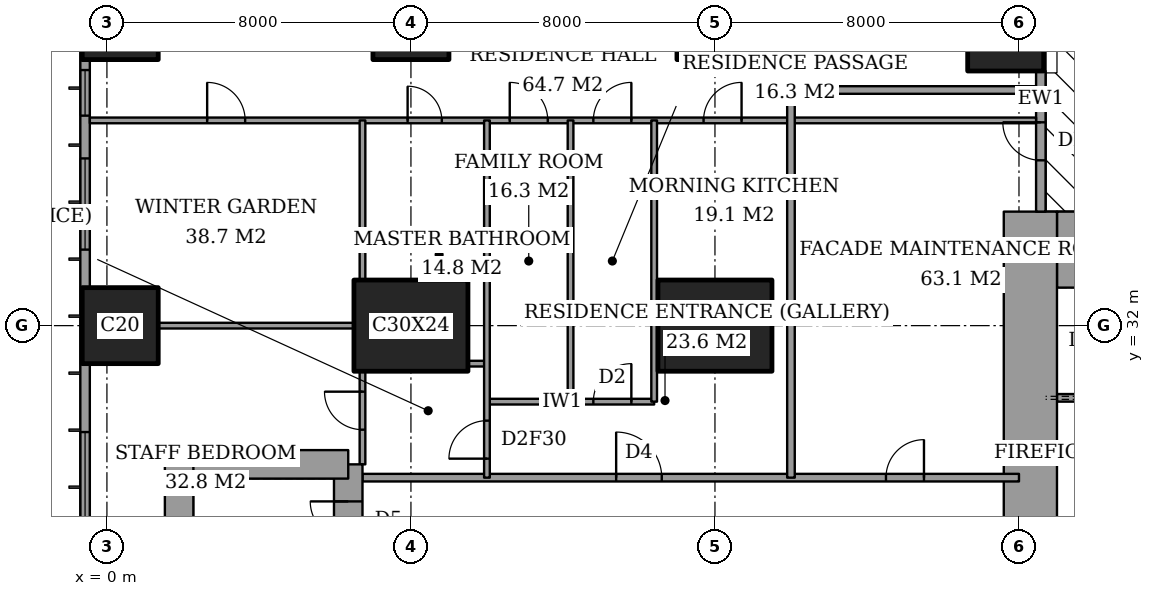
"""IFC4 building model, lengths in metres.
Left out: names, types, materials, properties, quantities, classifications, styles, units other than length and angle.
Written with IfcOpenShell. Run it as: python <this file> out.ifc"""

import sys

from ifc_helpers import new_model, si_unit, direction, frame, frame_2d, origin, origin_2d, place, context, subcontext, project, spatial, rectangle, extrude, element, fill, save


model = new_model("IFC4")
c1 = context("Model", 3, precision=1e-05, world=origin(), true_north=direction((0.0, 1.0)))
c2 = subcontext(c1, "Body", "Model", "MODEL_VIEW")
j1 = project(units=[si_unit("LENGTHUNIT", "METRE"), si_unit("PLANEANGLEUNIT", "RADIAN")], contexts=[c1])
p1 = place(None, origin())
s1 = spatial("IfcSite", under=j1, at=p1, CompositionType="ELEMENT")
p2 = place(p1, origin())
s2 = spatial("IfcBuilding", under=s1, at=p2, CompositionType="ELEMENT")
p3 = place(p2, frame((0.0, 0.0, 96.2)))
s3 = spatial("IfcBuildingStorey", under=s2, at=p3, CompositionType="ELEMENT", Elevation=96.2)
for number, where, z_axis, x_axis in (
    (1, (0.35, 32.0, 0.0), (0.0, 0.0, 1.0), (1.0, 0.0, 0.0)),
    (2, (0.35, 40.0, 0.0), (0.0, 0.0, 1.0), (1.0, 0.0, 0.0)),
):
    element("IfcColumn", number, at=place(p3, frame(where, z_axis=z_axis, x_axis=x_axis)), inside=s3, PredefinedType="COLUMN", context=c2, shape_type="SweptSolid", body=[
        extrude(rectangle(XDim=2.0, YDim=2.0, at=origin_2d()), origin(), (0.0, 0.0, 1.0), 3.6),
    ])
p4 = place(p3, frame((8.0, 32.0, 0.0), z_axis=(0.0, 0.0, 1.0), x_axis=(1.0, 0.0, 0.0)))
e3 = element("IfcColumn", 3, at=p4, inside=s3, PredefinedType="COLUMN", context=c2, shape_type="SweptSolid", body=[
    extrude(rectangle(XDim=3.0, YDim=2.4, at=origin_2d()), origin(), (0.0, 0.0, 1.0), 3.6),
])
p5 = place(p3, frame((8.0, 40.0, 0.0), z_axis=(0.0, 0.0, 1.0), x_axis=(1.0, 0.0, 0.0)))
e4 = element("IfcColumn", 4, at=p5, inside=s3, PredefinedType="COLUMN", context=c2, shape_type="SweptSolid", body=[
    extrude(rectangle(XDim=2.0, YDim=2.0, at=origin_2d()), origin(), (0.0, 0.0, 1.0), 3.6),
])
p6 = place(p3, frame((16.0, 32.0, 0.0), z_axis=(0.0, 0.0, 1.0), x_axis=(1.0, 0.0, 0.0)))
e5 = element("IfcColumn", 5, at=p6, inside=s3, PredefinedType="COLUMN", context=c2, shape_type="SweptSolid", body=[
    extrude(rectangle(XDim=3.0, YDim=2.4, at=origin_2d()), origin(), (0.0, 0.0, 1.0), 3.6),
])
p7 = place(p3, frame((16.0, 40.0, 0.0), z_axis=(0.0, 0.0, 1.0), x_axis=(1.0, 0.0, 0.0)))
e6 = element("IfcColumn", 6, at=p7, inside=s3, PredefinedType="COLUMN", context=c2, shape_type="SweptSolid", body=[
    extrude(rectangle(XDim=2.0, YDim=2.0, at=origin_2d()), origin(), (0.0, 0.0, 1.0), 3.6),
])
p8 = place(p3, frame((23.65, 40.0, 0.0), z_axis=(0.0, 0.0, 1.0), x_axis=(1.0, 0.0, 0.0)))
e7 = element("IfcColumn", 7, at=p8, inside=s3, PredefinedType="COLUMN", context=c2, shape_type="SweptSolid", body=[
    extrude(rectangle(XDim=2.0, YDim=2.6, at=origin_2d()), origin(), (0.0, 0.0, 1.0), 3.6),
])
p9 = place(p3, frame((25.0, 34.0, 0.0), z_axis=(0.0, 0.0, 1.0), x_axis=(1.0, 0.0, 0.0)))
e8 = element("IfcWall", 8, at=p9, inside=s3, PredefinedType="SHEAR", context=c2, shape_type="SweptSolid", body=[
    extrude(rectangle(XDim=3.15, YDim=2.0, at=frame_2d((1.575, 0.0))), origin(), (0.0, 0.0, 1.0), 3.6),
])
p10 = place(p3, frame((24.3, 23.15, 0.0), z_axis=(0.0, 0.0, 1.0), x_axis=(0.0, 1.0, 0.0)))
e9 = element("IfcWall", 9, at=p10, inside=s3, PredefinedType="SHEAR", context=c2, shape_type="SweptSolid", body=[
    extrude(rectangle(XDim=11.85, YDim=1.4, at=frame_2d((5.925, 0.0))), origin(), (0.0, 0.0, 1.0), 3.6),
])
p11 = place(p10, frame((0.75, 0.0, 0.0)))
e10 = element("IfcOpeningElement", 10, at=p11, cuts=e9, PredefinedType="OPENING", context=c2, shape_type="SweptSolid", body=[
    extrude(rectangle(XDim=1.8, YDim=2.4, at=frame_2d((0.9, 1.2))), frame((0.0, 0.71, 0.0), z_axis=(0.0, -1.0, 0.0), x_axis=(1.0, 0.0, 0.0)), (0.0, 0.0, 1.0), 1.42),
])
p12 = place(p3, frame((6.35, 19.65, 0.0), z_axis=(0.0, 0.0, 1.0), x_axis=(0.0, 1.0, 0.0)))
e11 = element("IfcWall", 11, at=p12, inside=s3, PredefinedType="SHEAR", context=c2, shape_type="SweptSolid", body=[
    extrude(rectangle(XDim=8.7, YDim=0.75, at=frame_2d((4.35, 0.0))), origin(), (0.0, 0.0, 1.0), 3.6),
])
p13 = place(p12, frame((6.725, 0.0, 0.0)))
e12 = element("IfcOpeningElement", 12, at=p13, cuts=e11, PredefinedType="OPENING", context=c2, shape_type="SweptSolid", body=[
    extrude(rectangle(XDim=1.0, YDim=2.1, at=frame_2d((0.5, 1.05))), frame((0.0, 0.385, 0.0), z_axis=(0.0, -1.0, 0.0), x_axis=(1.0, 0.0, 0.0)), (0.0, 0.0, 1.0), 0.77),
])
p14 = place(p3, frame((6.35, 28.35, 0.0), z_axis=(0.0, 0.0, 1.0), x_axis=(-1.0, 0.0, 0.0)))
e13 = element("IfcWall", 13, at=p14, inside=s3, PredefinedType="SHEAR", context=c2, shape_type="SweptSolid", body=[
    extrude(rectangle(XDim=4.45, YDim=0.75, at=frame_2d((2.225, 0.0))), origin(), (0.0, 0.0, 1.0), 3.6),
])
p15 = place(p3, frame((1.9, 28.35, 0.0), z_axis=(0.0, 0.0, 1.0), x_axis=(0.0, -1.0, 0.0)))
e14 = element("IfcWall", 14, at=p15, inside=s3, PredefinedType="SHEAR", context=c2, shape_type="SweptSolid", body=[
    extrude(rectangle(XDim=8.7, YDim=0.75, at=frame_2d((4.35, 0.0))), origin(), (0.0, 0.0, 1.0), 3.6),
])
p16 = place(p3, frame((24.575, 35.0, 0.0), z_axis=(0.0, 0.0, 1.0), x_axis=(0.0, 1.0, 0.0)))
e15 = element("IfcWall", 15, at=p16, inside=s3, PredefinedType="SOLIDWALL", context=c2, shape_type="SweptSolid", body=[
    extrude(rectangle(XDim=3.7, YDim=0.25, at=frame_2d((1.85, 0.0))), origin(), (0.0, 0.0, 1.0), 3.6),
])
p17 = place(p16, frame((1.35, 0.0, 0.0)))
e16 = element("IfcOpeningElement", 16, at=p17, cuts=e15, PredefinedType="OPENING", context=c2, shape_type="SweptSolid", body=[
    extrude(rectangle(XDim=1.0, YDim=2.1, at=frame_2d((0.5, 1.05))), frame((0.0, 0.135, 0.0), z_axis=(0.0, -1.0, 0.0), x_axis=(1.0, 0.0, 0.0)), (0.0, 0.0, 1.0), 0.27),
])
p18 = place(p3, frame((-0.575, 44.825, 0.0), z_axis=(0.0, 0.0, 1.0), x_axis=(0.0, -1.0, 0.0)))
e17 = element("IfcWall", 17, at=p18, inside=s3, PredefinedType="SOLIDWALL", context=c2, shape_type="SweptSolid", body=[
    extrude(rectangle(XDim=41.65, YDim=0.25, at=frame_2d((20.825, 0.0))), origin(), (0.0, 0.0, 1.0), 3.6),
])
p19 = place(p18, frame((0.775, 0.0, 0.4)))
e18 = element("IfcOpeningElement", 18, at=p19, cuts=e17, PredefinedType="OPENING", context=c2, shape_type="SweptSolid", body=[
    extrude(rectangle(XDim=2.4, YDim=2.2, at=frame_2d((1.2, 1.1))), frame((0.0, 0.135, 0.0), z_axis=(0.0, -1.0, 0.0), x_axis=(1.0, 0.0, 0.0)), (0.0, 0.0, 1.0), 0.27),
])
p20 = place(p18, frame((6.1, 0.0, 0.4)))
e19 = element("IfcOpeningElement", 19, at=p20, cuts=e17, PredefinedType="OPENING", context=c2, shape_type="SweptSolid", body=[
    extrude(rectangle(XDim=1.2, YDim=2.2, at=frame_2d((0.6, 1.1))), frame((0.0, 0.135, 0.0), z_axis=(0.0, -1.0, 0.0), x_axis=(1.0, 0.0, 0.0)), (0.0, 0.0, 1.0), 0.27),
])
p21 = place(p18, frame((8.425, 0.0, 0.4)))
e20 = element("IfcOpeningElement", 20, at=p21, cuts=e17, PredefinedType="OPENING", context=c2, shape_type="SweptSolid", body=[
    extrude(rectangle(XDim=2.4, YDim=2.2, at=frame_2d((1.2, 1.1))), frame((0.0, 0.135, 0.0), z_axis=(0.0, -1.0, 0.0), x_axis=(1.0, 0.0, 0.0)), (0.0, 0.0, 1.0), 0.27),
])
p22 = place(p18, frame((15.625, 0.0, 0.4)))
e21 = element("IfcOpeningElement", 21, at=p22, cuts=e17, PredefinedType="OPENING", context=c2, shape_type="SweptSolid", body=[
    extrude(rectangle(XDim=2.4, YDim=2.2, at=frame_2d((1.2, 1.1))), frame((0.0, 0.135, 0.0), z_axis=(0.0, -1.0, 0.0), x_axis=(1.0, 0.0, 0.0)), (0.0, 0.0, 1.0), 0.27),
])
p23 = place(p18, frame((23.625, 0.0, 0.4)))
e22 = element("IfcOpeningElement", 22, at=p23, cuts=e17, PredefinedType="OPENING", context=c2, shape_type="SweptSolid", body=[
    extrude(rectangle(XDim=2.4, YDim=2.2, at=frame_2d((1.2, 1.1))), frame((0.0, 0.135, 0.0), z_axis=(0.0, -1.0, 0.0), x_axis=(1.0, 0.0, 0.0)), (0.0, 0.0, 1.0), 0.27),
])
p24 = place(p18, frame((30.725, 0.0, 0.4)))
e23 = element("IfcOpeningElement", 23, at=p24, cuts=e17, PredefinedType="OPENING", context=c2, shape_type="SweptSolid", body=[
    extrude(rectangle(XDim=2.4, YDim=2.2, at=frame_2d((1.2, 1.1))), frame((0.0, 0.135, 0.0), z_axis=(0.0, -1.0, 0.0), x_axis=(1.0, 0.0, 0.0)), (0.0, 0.0, 1.0), 0.27),
])
p25 = place(p18, frame((34.325, 0.0, 0.4)))
e24 = element("IfcOpeningElement", 24, at=p25, cuts=e17, PredefinedType="OPENING", context=c2, shape_type="SweptSolid", body=[
    extrude(rectangle(XDim=1.2, YDim=2.2, at=frame_2d((0.6, 1.1))), frame((0.0, 0.135, 0.0), z_axis=(0.0, -1.0, 0.0), x_axis=(1.0, 0.0, 0.0)), (0.0, 0.0, 1.0), 0.27),
])
p26 = place(p18, frame((38.475, 0.0, 0.4)))
e25 = element("IfcOpeningElement", 25, at=p26, cuts=e17, PredefinedType="OPENING", context=c2, shape_type="SweptSolid", body=[
    extrude(rectangle(XDim=2.4, YDim=2.2, at=frame_2d((1.2, 1.1))), frame((0.0, 0.135, 0.0), z_axis=(0.0, -1.0, 0.0), x_axis=(1.0, 0.0, 0.0)), (0.0, 0.0, 1.0), 0.27),
])
p27 = place(p3, frame((6.725, 28.0, 0.0), z_axis=(0.0, 0.0, 1.0), x_axis=(1.0, 0.0, 0.0)))
e26 = element("IfcWall", 26, at=p27, inside=s3, PredefinedType="PARTITIONING", context=c2, shape_type="SweptSolid", body=[
    extrude(rectangle(XDim=17.275, YDim=0.2, at=frame_2d((8.637, 0.0))), origin(), (0.0, 0.0, 1.0), 3.35),
])
p28 = place(p27, frame((6.675, 0.0, 0.0)))
e27 = element("IfcOpeningElement", 27, at=p28, cuts=e26, PredefinedType="OPENING", context=c2, shape_type="SweptSolid", body=[
    extrude(rectangle(XDim=1.2, YDim=2.4, at=frame_2d((0.6, 1.2))), frame((0.0, 0.11, 0.0), z_axis=(0.0, -1.0, 0.0), x_axis=(1.0, 0.0, 0.0)), (0.0, 0.0, 1.0), 0.22),
])
p29 = place(p27, frame((13.775, 0.0, 0.0)))
e28 = element("IfcOpeningElement", 28, at=p29, cuts=e26, PredefinedType="OPENING", context=c2, shape_type="SweptSolid", body=[
    extrude(rectangle(XDim=1.0, YDim=2.1, at=frame_2d((0.5, 1.05))), frame((0.0, 0.11, 0.0), z_axis=(0.0, -1.0, 0.0), x_axis=(1.0, 0.0, 0.0)), (0.0, 0.0, 1.0), 0.22),
])
p30 = place(p3, frame((10.0, 30.0, 0.0), z_axis=(0.0, 0.0, 1.0), x_axis=(1.0, 0.0, 0.0)))
e29 = element("IfcWall", 29, at=p30, inside=s3, PredefinedType="PARTITIONING", context=c2, shape_type="SweptSolid", body=[
    extrude(rectangle(XDim=4.4, YDim=0.15, at=frame_2d((2.2, 0.0))), origin(), (0.0, 0.0, 1.0), 3.35),
])
p31 = place(p30, frame((2.8, 0.0, 0.0)))
e30 = element("IfcOpeningElement", 30, at=p31, cuts=e29, PredefinedType="OPENING", context=c2, shape_type="SweptSolid", body=[
    extrude(rectangle(XDim=1.0, YDim=2.1, at=frame_2d((0.5, 1.05))), frame((0.0, 0.085, 0.0), z_axis=(0.0, -1.0, 0.0), x_axis=(1.0, 0.0, 0.0)), (0.0, 0.0, 1.0), 0.17),
])
p32 = place(p3, frame((9.5, 31.0, 0.0), z_axis=(0.0, 0.0, 1.0), x_axis=(1.0, 0.0, 0.0)))
e31 = element("IfcWall", 31, at=p32, inside=s3, PredefinedType="PARTITIONING", context=c2, shape_type="SweptSolid", body=[
    extrude(rectangle(XDim=0.5, YDim=0.15, at=frame_2d((0.25, 0.0))), origin(), (0.0, 0.0, 1.0), 3.35),
])
p33 = place(p3, frame((1.35, 32.0, 0.0), z_axis=(0.0, 0.0, 1.0), x_axis=(1.0, 0.0, 0.0)))
e32 = element("IfcWall", 32, at=p33, inside=s3, PredefinedType="PARTITIONING", context=c2, shape_type="SweptSolid", body=[
    extrude(rectangle(XDim=5.15, YDim=0.15, at=frame_2d((2.575, 0.0))), origin(), (0.0, 0.0, 1.0), 2.634),
])
p34 = place(p3, frame((17.5, 32.1, 0.0), z_axis=(0.0, 0.0, 1.0), x_axis=(1.0, 0.0, 0.0)))
e33 = element("IfcWall", 33, at=p34, inside=s3, PredefinedType="PARTITIONING", context=c2, shape_type="SweptSolid", body=[
    extrude(rectangle(XDim=0.5, YDim=0.15, at=frame_2d((0.25, 0.0))), origin(), (0.0, 0.0, 1.0), 2.634),
])
p35 = place(p3, frame((-0.45, 37.4, 0.0), z_axis=(0.0, 0.0, 1.0), x_axis=(1.0, 0.0, 0.0)))
e34 = element("IfcWall", 34, at=p35, inside=s3, PredefinedType="PARTITIONING", context=c2, shape_type="SweptSolid", body=[
    extrude(rectangle(XDim=24.9, YDim=0.15, at=frame_2d((12.45, 0.0))), origin(), (0.0, 0.0, 1.0), 3.35),
])
p36 = place(p35, frame((13.25, 0.0, 0.0)))
e35 = element("IfcOpeningElement", 35, at=p36, cuts=e34, PredefinedType="OPENING", context=c2, shape_type="SweptSolid", body=[
    extrude(rectangle(XDim=1.0, YDim=2.1, at=frame_2d((0.5, 1.05))), frame((0.0, 0.085, 0.0), z_axis=(0.0, -1.0, 0.0), x_axis=(1.0, 0.0, 0.0)), (0.0, 0.0, 1.0), 0.17),
])
p37 = place(p35, frame((3.087, 0.0, 0.0)))
e36 = element("IfcOpeningElement", 36, at=p37, cuts=e34, PredefinedType="OPENING", context=c2, shape_type="SweptSolid", body=[
    extrude(rectangle(XDim=1.0, YDim=2.1, at=frame_2d((0.5, 1.05))), frame((0.0, 0.085, 0.0), z_axis=(0.0, -1.0, 0.0), x_axis=(1.0, 0.0, 0.0)), (0.0, 0.0, 1.0), 0.17),
])
p38 = place(p35, frame((8.363, 0.0, 0.0)))
e37 = element("IfcOpeningElement", 37, at=p38, cuts=e34, PredefinedType="OPENING", context=c2, shape_type="SweptSolid", body=[
    extrude(rectangle(XDim=0.9, YDim=2.1, at=frame_2d((0.45, 1.05))), frame((0.0, 0.085, 0.0), z_axis=(0.0, -1.0, 0.0), x_axis=(1.0, 0.0, 0.0)), (0.0, 0.0, 1.0), 0.17),
])
p39 = place(p35, frame((11.05, 0.0, 0.0)))
e38 = element("IfcOpeningElement", 38, at=p39, cuts=e34, PredefinedType="OPENING", context=c2, shape_type="SweptSolid", body=[
    extrude(rectangle(XDim=1.0, YDim=2.1, at=frame_2d((0.5, 1.05))), frame((0.0, 0.085, 0.0), z_axis=(0.0, -1.0, 0.0), x_axis=(1.0, 0.0, 0.0)), (0.0, 0.0, 1.0), 0.17),
])
p40 = place(p35, frame((16.15, 0.0, 0.0)))
e39 = element("IfcOpeningElement", 39, at=p40, cuts=e34, PredefinedType="OPENING", context=c2, shape_type="SweptSolid", body=[
    extrude(rectangle(XDim=1.0, YDim=2.1, at=frame_2d((0.5, 1.05))), frame((0.0, 0.085, 0.0), z_axis=(0.0, -1.0, 0.0), x_axis=(1.0, 0.0, 0.0)), (0.0, 0.0, 1.0), 0.17),
])
p41 = place(p3, frame((18.0, 38.2, 0.0), z_axis=(0.0, 0.0, 1.0), x_axis=(1.0, 0.0, 0.0)))
e40 = element("IfcWall", 40, at=p41, inside=s3, PredefinedType="PARTITIONING", context=c2, shape_type="SweptSolid", body=[
    extrude(rectangle(XDim=6.45, YDim=0.2, at=frame_2d((3.225, 0.0))), origin(), (0.0, 0.0, 1.0), 3.35),
])
p42 = place(p3, frame((6.725, 28.35, 0.0), z_axis=(0.0, 0.0, 1.0), x_axis=(0.0, 1.0, 0.0)))
e41 = element("IfcWall", 41, at=p42, inside=s3, PredefinedType="PARTITIONING", context=c2, shape_type="SweptSolid", body=[
    extrude(rectangle(XDim=2.45, YDim=0.15, at=frame_2d((1.225, 0.0))), origin(), (0.0, 0.0, 1.0), 3.35),
])
p43 = place(p42, frame((0.913, 0.0, 0.0)))
e42 = element("IfcOpeningElement", 42, at=p43, cuts=e41, PredefinedType="OPENING", context=c2, shape_type="SweptSolid", body=[
    extrude(rectangle(XDim=1.0, YDim=2.1, at=frame_2d((0.5, 1.05))), frame((0.0, 0.085, 0.0), z_axis=(0.0, -1.0, 0.0), x_axis=(1.0, 0.0, 0.0)), (0.0, 0.0, 1.0), 0.17),
])
p44 = place(p3, frame((6.725, 33.2, 0.0), z_axis=(0.0, 0.0, 1.0), x_axis=(0.0, 1.0, 0.0)))
e43 = element("IfcWall", 43, at=p44, inside=s3, PredefinedType="PARTITIONING", context=c2, shape_type="SweptSolid", body=[
    extrude(rectangle(XDim=4.2, YDim=0.15, at=frame_2d((2.1, 0.0))), origin(), (0.0, 0.0, 1.0), 3.35),
])
p45 = place(p3, frame((10.0, 28.0, 0.0), z_axis=(0.0, 0.0, 1.0), x_axis=(0.0, 1.0, 0.0)))
e44 = element("IfcWall", 44, at=p45, inside=s3, PredefinedType="PARTITIONING", context=c2, shape_type="SweptSolid", body=[
    extrude(rectangle(XDim=9.4, YDim=0.15, at=frame_2d((4.7, 0.0))), origin(), (0.0, 0.0, 1.0), 3.35),
])
p46 = place(p45, frame((0.5, 0.0, 0.0)))
e45 = element("IfcOpeningElement", 45, at=p46, cuts=e44, PredefinedType="OPENING", context=c2, shape_type="SweptSolid", body=[
    extrude(rectangle(XDim=1.0, YDim=2.1, at=frame_2d((0.5, 1.05))), frame((0.0, 0.085, 0.0), z_axis=(0.0, -1.0, 0.0), x_axis=(1.0, 0.0, 0.0)), (0.0, 0.0, 1.0), 0.17),
])
for number, where, z_axis, x_axis in (
    (46, (12.2, 30.0, 0.0), (0.0, 0.0, 1.0), (0.0, 1.0, 0.0)),
    (47, (14.4, 30.0, 0.0), (0.0, 0.0, 1.0), (0.0, 1.0, 0.0)),
):
    element("IfcWall", number, at=place(p3, frame(where, z_axis=z_axis, x_axis=x_axis)), inside=s3, PredefinedType="PARTITIONING", context=c2, shape_type="SweptSolid", body=[
        extrude(rectangle(XDim=7.4, YDim=0.15, at=frame_2d((3.7, 0.0))), origin(), (0.0, 0.0, 1.0), 3.35),
    ])
p47 = place(p3, frame((18.0, 28.0, 0.0), z_axis=(0.0, 0.0, 1.0), x_axis=(0.0, 1.0, 0.0)))
e48 = element("IfcWall", 48, at=p47, inside=s3, PredefinedType="PARTITIONING", context=c2, shape_type="SweptSolid", body=[
    extrude(rectangle(XDim=10.2, YDim=0.2, at=frame_2d((5.1, 0.0))), origin(), (0.0, 0.0, 1.0), 3.35),
])
p48 = place(p3, frame((25.0, 30.1, 0.0), z_axis=(0.0, 0.0, 1.0), x_axis=(1.0, 0.0, 0.0)))
e49 = element("IfcWall", 49, at=p48, inside=s3, PredefinedType="PARTITIONING", context=c2, shape_type="SweptSolid", body=[
    extrude(rectangle(XDim=12.7, YDim=0.2, at=frame_2d((6.35, 0.0))), origin(), (0.0, 0.0, 1.0), 3.6),
])
p49 = place(p48, frame((0.9, 0.0, 0.0)))
e50 = element("IfcOpeningElement", 50, at=p49, cuts=e49, PredefinedType="OPENING", context=c2, shape_type="SweptSolid", body=[
    extrude(rectangle(XDim=1.2, YDim=2.1, at=frame_2d((0.6, 1.05))), frame((0.0, 0.11, 0.0), z_axis=(0.0, -1.0, 0.0), x_axis=(1.0, 0.0, 0.0)), (0.0, 0.0, 1.0), 0.22),
])
p50 = place(p17, origin())
e51 = element("IfcDoor", 51, at=p50, inside=s3, OperationType="SINGLE_SWING_LEFT", PredefinedType="DOOR", context=c2, shape_type="SweptSolid", body=[
    extrude(rectangle(XDim=1.0, YDim=2.1, at=frame_2d((0.5, 1.05))), frame((0.0, 0.025, 0.0), z_axis=(0.0, -1.0, 0.0), x_axis=(1.0, 0.0, 0.0)), (0.0, 0.0, 1.0), 0.05),
])
fill(e16, e51)
p51 = place(p20, origin())
e52 = element("IfcWindow", 52, at=p51, inside=s3, PartitioningType="SINGLE_PANEL", PredefinedType="WINDOW", context=c2, shape_type="SweptSolid", body=[
    extrude(rectangle(XDim=1.2, YDim=2.2, at=frame_2d((0.6, 1.1))), frame((0.0, 0.03, 0.0), z_axis=(0.0, -1.0, 0.0), x_axis=(1.0, 0.0, 0.0)), (0.0, 0.0, 1.0), 0.06),
])
fill(e19, e52)
p52 = place(p21, origin())
e53 = element("IfcWindow", 53, at=p52, inside=s3, PartitioningType="SINGLE_PANEL", PredefinedType="WINDOW", context=c2, shape_type="SweptSolid", body=[
    extrude(rectangle(XDim=2.4, YDim=2.2, at=frame_2d((1.2, 1.1))), frame((0.0, 0.03, 0.0), z_axis=(0.0, -1.0, 0.0), x_axis=(1.0, 0.0, 0.0)), (0.0, 0.0, 1.0), 0.06),
])
fill(e20, e53)
p53 = place(p22, origin())
e54 = element("IfcWindow", 54, at=p53, inside=s3, PartitioningType="SINGLE_PANEL", PredefinedType="WINDOW", context=c2, shape_type="SweptSolid", body=[
    extrude(rectangle(XDim=2.4, YDim=2.2, at=frame_2d((1.2, 1.1))), frame((0.0, 0.03, 0.0), z_axis=(0.0, -1.0, 0.0), x_axis=(1.0, 0.0, 0.0)), (0.0, 0.0, 1.0), 0.06),
])
fill(e21, e54)
p54 = place(p36, origin())
e55 = element("IfcDoor", 55, at=p54, inside=s3, OperationType="SINGLE_SWING_LEFT", PredefinedType="DOOR", context=c2, shape_type="SweptSolid", body=[
    extrude(rectangle(XDim=1.0, YDim=2.1, at=frame_2d((0.5, 1.05))), frame((0.0, 0.025, 0.0), z_axis=(0.0, -1.0, 0.0), x_axis=(1.0, 0.0, 0.0)), (0.0, 0.0, 1.0), 0.05),
])
fill(e35, e55)
p55 = place(p37, origin())
e56 = element("IfcDoor", 56, at=p55, inside=s3, OperationType="SINGLE_SWING_RIGHT", PredefinedType="DOOR", context=c2, shape_type="SweptSolid", body=[
    extrude(rectangle(XDim=1.0, YDim=2.1, at=frame_2d((0.5, 1.05))), frame((0.0, 0.025, 0.0), z_axis=(0.0, -1.0, 0.0), x_axis=(1.0, 0.0, 0.0)), (0.0, 0.0, 1.0), 0.05),
])
fill(e36, e56)
p56 = place(p43, origin())
e57 = element("IfcDoor", 57, at=p56, inside=s3, OperationType="SINGLE_SWING_LEFT", PredefinedType="DOOR", context=c2, shape_type="SweptSolid", body=[
    extrude(rectangle(XDim=1.0, YDim=2.1, at=frame_2d((0.5, 1.05))), frame((0.0, 0.025, 0.0), z_axis=(0.0, -1.0, 0.0), x_axis=(1.0, 0.0, 0.0)), (0.0, 0.0, 1.0), 0.05),
])
fill(e42, e57)
p57 = place(p38, origin())
e58 = element("IfcDoor", 58, at=p57, inside=s3, OperationType="SINGLE_SWING_RIGHT", PredefinedType="DOOR", context=c2, shape_type="SweptSolid", body=[
    extrude(rectangle(XDim=0.9, YDim=2.1, at=frame_2d((0.45, 1.05))), frame((0.0, 0.025, 0.0), z_axis=(0.0, -1.0, 0.0), x_axis=(1.0, 0.0, 0.0)), (0.0, 0.0, 1.0), 0.05),
])
fill(e37, e58)
p58 = place(p46, origin())
e59 = element("IfcDoor", 59, at=p58, inside=s3, OperationType="SINGLE_SWING_RIGHT", PredefinedType="DOOR", context=c2, shape_type="SweptSolid", body=[
    extrude(rectangle(XDim=1.0, YDim=2.1, at=frame_2d((0.5, 1.05))), frame((0.0, 0.025, 0.0), z_axis=(0.0, -1.0, 0.0), x_axis=(1.0, 0.0, 0.0)), (0.0, 0.0, 1.0), 0.05),
])
fill(e45, e59)
p59 = place(p28, origin())
e60 = element("IfcDoor", 60, at=p59, inside=s3, OperationType="SINGLE_SWING_RIGHT", PredefinedType="DOOR", context=c2, shape_type="SweptSolid", body=[
    extrude(rectangle(XDim=1.2, YDim=2.4, at=frame_2d((0.6, 1.2))), frame((0.0, 0.025, 0.0), z_axis=(0.0, -1.0, 0.0), x_axis=(1.0, 0.0, 0.0)), (0.0, 0.0, 1.0), 0.05),
])
fill(e27, e60)
p60 = place(p39, origin())
e61 = element("IfcDoor", 61, at=p60, inside=s3, OperationType="SINGLE_SWING_RIGHT", PredefinedType="DOOR", context=c2, shape_type="SweptSolid", body=[
    extrude(rectangle(XDim=1.0, YDim=2.1, at=frame_2d((0.5, 1.05))), frame((0.0, 0.025, 0.0), z_axis=(0.0, -1.0, 0.0), x_axis=(1.0, 0.0, 0.0)), (0.0, 0.0, 1.0), 0.05),
])
fill(e38, e61)
p61 = place(p31, origin())
e62 = element("IfcDoor", 62, at=p61, inside=s3, OperationType="SINGLE_SWING_LEFT", PredefinedType="DOOR", context=c2, shape_type="SweptSolid", body=[
    extrude(rectangle(XDim=1.0, YDim=2.1, at=frame_2d((0.5, 1.05))), frame((0.0, 0.025, 0.0), z_axis=(0.0, -1.0, 0.0), x_axis=(1.0, 0.0, 0.0)), (0.0, 0.0, 1.0), 0.05),
])
fill(e30, e62)
p62 = place(p40, origin())
e63 = element("IfcDoor", 63, at=p62, inside=s3, OperationType="SINGLE_SWING_LEFT", PredefinedType="DOOR", context=c2, shape_type="SweptSolid", body=[
    extrude(rectangle(XDim=1.0, YDim=2.1, at=frame_2d((0.5, 1.05))), frame((0.0, 0.025, 0.0), z_axis=(0.0, -1.0, 0.0), x_axis=(1.0, 0.0, 0.0)), (0.0, 0.0, 1.0), 0.05),
])
fill(e39, e63)
p63 = place(p29, origin())
e64 = element("IfcDoor", 64, at=p63, inside=s3, OperationType="SINGLE_SWING_LEFT", PredefinedType="DOOR", context=c2, shape_type="SweptSolid", body=[
    extrude(rectangle(XDim=1.0, YDim=2.1, at=frame_2d((0.5, 1.05))), frame((0.0, 0.025, 0.0), z_axis=(0.0, -1.0, 0.0), x_axis=(1.0, 0.0, 0.0)), (0.0, 0.0, 1.0), 0.05),
])
fill(e28, e64)
p64 = place(p13, origin())
e65 = element("IfcDoor", 65, at=p64, inside=s3, OperationType="SINGLE_SWING_LEFT", PredefinedType="DOOR", context=c2, shape_type="SweptSolid", body=[
    extrude(rectangle(XDim=1.0, YDim=2.1, at=frame_2d((0.5, 1.05))), frame((0.0, 0.025, 0.0), z_axis=(0.0, -1.0, 0.0), x_axis=(1.0, 0.0, 0.0)), (0.0, 0.0, 1.0), 0.05),
])
fill(e12, e65)
save(model, sys.argv[1])
